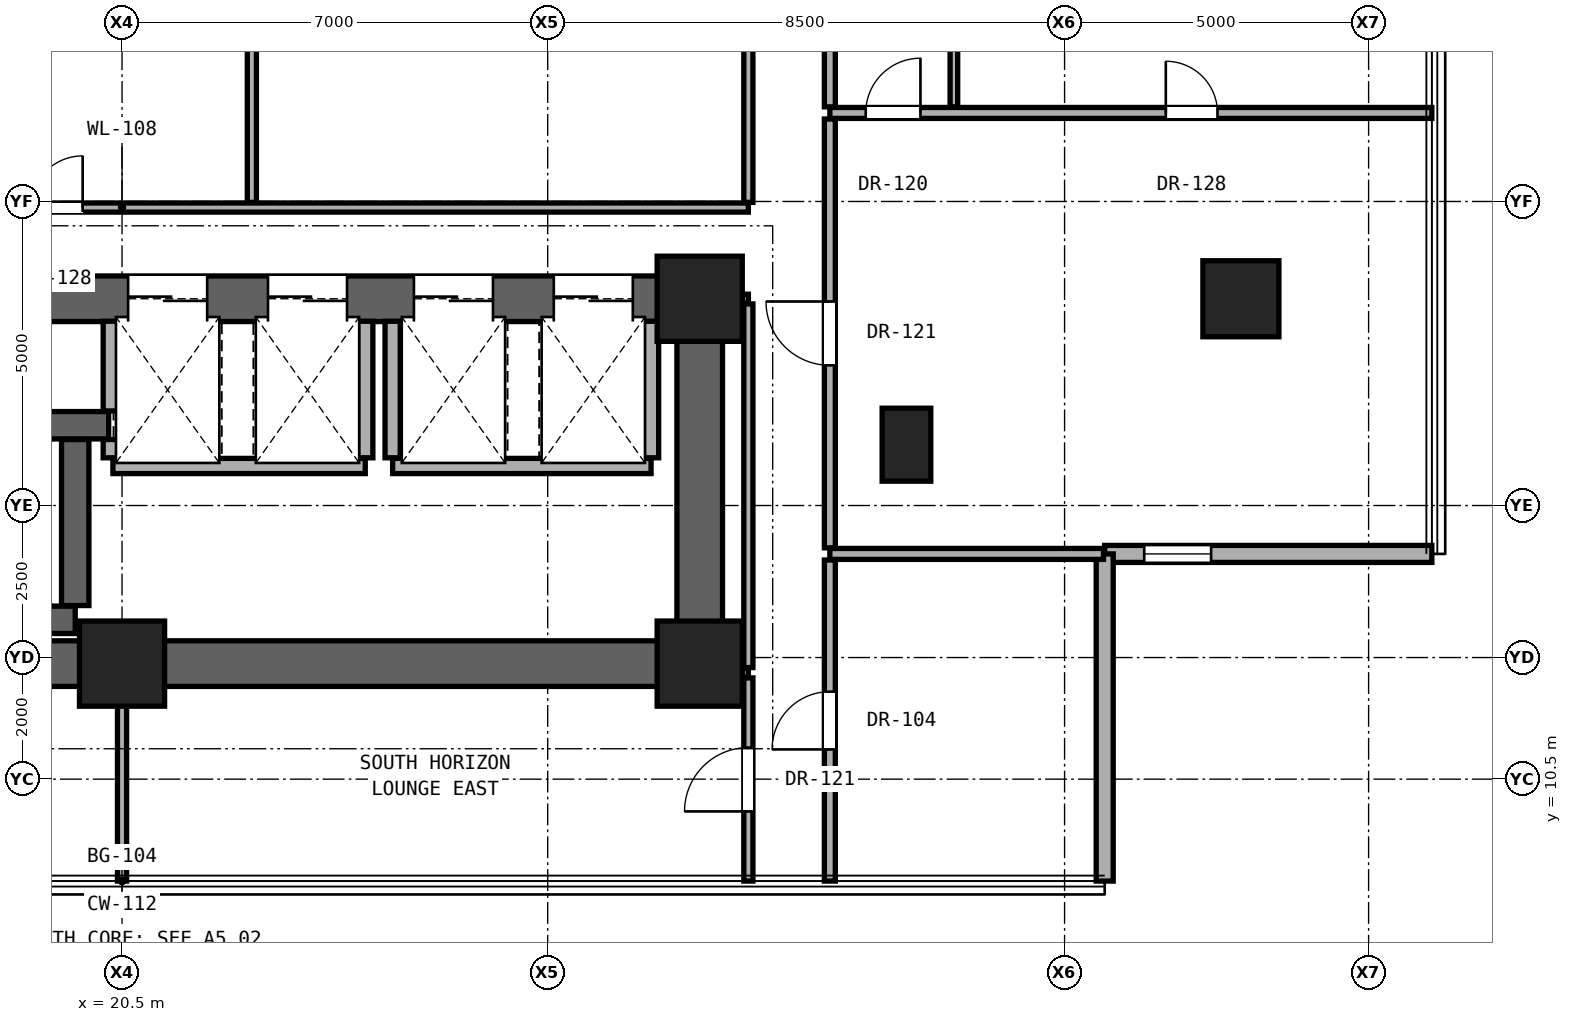
"""IFC4 building model, lengths in metres.
Left out: names, types, materials, properties, quantities, classifications, styles, units other than length and angle.
Written with IfcOpenShell. Run it as: python <this file> out.ifc"""

import sys

from ifc_helpers import new_model, si_unit, direction, frame, frame_2d, origin, origin_2d, place, context, subcontext, project, spatial, rectangle, hollow_rectangle, extrude, element, fill, save


model = new_model("IFC4")
c1 = context("Model", 3, precision=1e-05, world=origin(), true_north=direction((0.0, 1.0)))
c2 = subcontext(c1, "Body", "Model", "MODEL_VIEW")
j1 = project(units=[si_unit("LENGTHUNIT", "METRE"), si_unit("PLANEANGLEUNIT", "RADIAN")], contexts=[c1])
p1 = place(None, origin())
s1 = spatial("IfcSite", under=j1, at=p1, CompositionType="ELEMENT")
p2 = place(p1, origin())
s2 = spatial("IfcBuilding", under=s1, at=p2, CompositionType="ELEMENT")
p3 = place(p2, frame((0.0, 0.0, 29.0)))
s3 = spatial("IfcBuildingStorey", under=s2, at=p3, CompositionType="ELEMENT", Elevation=29.0)
for number, where, z_axis, x_axis in (
    (1, (20.5, 12.4, 0.0), (0.0, 0.0, 1.0), (1.0, 0.0, 0.0)),
    (2, (30.0, 12.4, 0.0), (0.0, 0.0, 1.0), (1.0, 0.0, 0.0)),
    (3, (30.0, 18.4, 0.0), (0.0, 0.0, 1.0), (1.0, 0.0, 0.0)),
):
    element("IfcColumn", number, at=place(p3, frame(where, z_axis=z_axis, x_axis=x_axis)), inside=s3, PredefinedType="COLUMN", context=c2, shape_type="SweptSolid", body=[
        extrude(rectangle(XDim=1.4, YDim=1.4, at=origin_2d()), origin(), (0.0, 0.0, 1.0), 3.3),
    ])
p4 = place(p3, frame((38.9, 18.4, 0.0), z_axis=(0.0, 0.0, 1.0), x_axis=(1.0, 0.0, 0.0)))
e4 = element("IfcColumn", 4, at=p4, inside=s3, PredefinedType="COLUMN", context=c2, shape_type="SweptSolid", body=[
    extrude(hollow_rectangle(XDim=1.25, YDim=1.25, WallThickness=0.07, at=origin_2d()), origin(), (0.0, 0.0, 1.0), 3.3),
])
p5 = place(p3, frame((33.4, 16.0, 0.0), z_axis=(0.0, 0.0, 1.0), x_axis=(1.0, 0.0, 0.0)))
e5 = element("IfcColumn", 5, at=p5, inside=s3, PredefinedType="PILASTER", context=c2, shape_type="SweptSolid", body=[
    extrude(rectangle(XDim=0.8, YDim=1.2, at=origin_2d()), origin(), (0.0, 0.0, 1.0), 3.3),
])
p6 = place(p3, frame((11.0, 12.4, 0.0), z_axis=(0.0, 0.0, 1.0), x_axis=(1.0, 0.0, 0.0)))
e6 = element("IfcWall", 6, at=p6, inside=s3, PredefinedType="SHEAR", context=c2, shape_type="SweptSolid", body=[
    extrude(rectangle(XDim=19.0, YDim=0.75, at=frame_2d((9.5, 0.0))), origin(), (0.0, 0.0, 1.0), 3.06),
])
p7 = place(p3, frame((30.0, 12.4, 0.0), z_axis=(0.0, 0.0, 1.0), x_axis=(0.0, 1.0, 0.0)))
e7 = element("IfcWall", 7, at=p7, inside=s3, PredefinedType="SHEAR", context=c2, shape_type="SweptSolid", body=[
    extrude(rectangle(XDim=6.0, YDim=0.75, at=frame_2d((3.0, 0.0))), origin(), (0.0, 0.0, 1.0), 3.06),
])
p8 = place(p3, frame((11.0, 18.4, 0.0), z_axis=(0.0, 0.0, 1.0), x_axis=(1.0, 0.0, 0.0)))
e8 = element("IfcWall", 8, at=p8, inside=s3, PredefinedType="SHEAR", context=c2, shape_type="SweptSolid", body=[
    extrude(rectangle(XDim=19.0, YDim=0.75, at=frame_2d((9.5, 0.0))), origin(), (0.0, 0.0, 1.0), 3.06),
])
p9 = place(p8, frame((4.175, 0.0, 0.0)))
e9 = element("IfcOpeningElement", 9, at=p9, cuts=e8, PredefinedType="OPENING", context=c2, shape_type="SweptSolid", body=[
    extrude(rectangle(XDim=1.2, YDim=2.25, at=frame_2d((0.6, 1.125))), frame((0.0, 0.385, 0.0), z_axis=(0.0, -1.0, 0.0), x_axis=(1.0, 0.0, 0.0)), (0.0, 0.0, 1.0), 0.77),
])
p10 = place(p8, frame((9.6, 0.0, 0.0)))
e10 = element("IfcOpeningElement", 10, at=p10, cuts=e8, PredefinedType="OPENING", context=c2, shape_type="SweptSolid", body=[
    extrude(rectangle(XDim=1.3, YDim=2.3, at=frame_2d((0.65, 1.15))), frame((0.0, 0.385, 0.0), z_axis=(0.0, -1.0, 0.0), x_axis=(1.0, 0.0, 0.0)), (0.0, 0.0, 1.0), 0.77),
])
p11 = place(p8, frame((11.9, 0.0, 0.0)))
e11 = element("IfcOpeningElement", 11, at=p11, cuts=e8, PredefinedType="OPENING", context=c2, shape_type="SweptSolid", body=[
    extrude(rectangle(XDim=1.3, YDim=2.3, at=frame_2d((0.65, 1.15))), frame((0.0, 0.385, 0.0), z_axis=(0.0, -1.0, 0.0), x_axis=(1.0, 0.0, 0.0)), (0.0, 0.0, 1.0), 0.77),
])
p12 = place(p8, frame((14.3, 0.0, 0.0)))
e12 = element("IfcOpeningElement", 12, at=p12, cuts=e8, PredefinedType="OPENING", context=c2, shape_type="SweptSolid", body=[
    extrude(rectangle(XDim=1.3, YDim=2.3, at=frame_2d((0.65, 1.15))), frame((0.0, 0.385, 0.0), z_axis=(0.0, -1.0, 0.0), x_axis=(1.0, 0.0, 0.0)), (0.0, 0.0, 1.0), 0.77),
])
p13 = place(p8, frame((16.6, 0.0, 0.0)))
e13 = element("IfcOpeningElement", 13, at=p13, cuts=e8, PredefinedType="OPENING", context=c2, shape_type="SweptSolid", body=[
    extrude(rectangle(XDim=1.3, YDim=2.3, at=frame_2d((0.65, 1.15))), frame((0.0, 0.385, 0.0), z_axis=(0.0, -1.0, 0.0), x_axis=(1.0, 0.0, 0.0)), (0.0, 0.0, 1.0), 0.77),
])
p14 = place(p3, frame((36.66, 14.204, 0.0), z_axis=(0.0, 0.0, 1.0), x_axis=(1.0, 0.0, 0.0)))
e14 = element("IfcWall", 14, at=p14, inside=s3, PredefinedType="SOLIDWALL", context=c2, shape_type="SweptSolid", body=[
    extrude(rectangle(XDim=5.38, YDim=0.28, at=frame_2d((2.69, 0.0))), origin(), (0.0, 0.0, 1.0), 3.04),
])
p15 = place(p14, frame((0.65, 0.0, 0.85)))
e15 = element("IfcOpeningElement", 15, at=p15, cuts=e14, PredefinedType="OPENING", context=c2, shape_type="SweptSolid", body=[
    extrude(rectangle(XDim=1.1, YDim=2.0, at=frame_2d((0.55, 1.0))), frame((0.0, 0.15, 0.0), z_axis=(0.0, -1.0, 0.0), x_axis=(1.0, 0.0, 0.0)), (0.0, 0.0, 1.0), 0.3),
])
p16 = place(p3, frame((36.66, 8.824, 0.0), z_axis=(0.0, 0.0, 1.0), x_axis=(0.0, 1.0, 0.0)))
e16 = element("IfcWall", 16, at=p16, inside=s3, PredefinedType="SOLIDWALL", context=c2, shape_type="SweptSolid", body=[
    extrude(rectangle(XDim=5.38, YDim=0.28, at=frame_2d((2.69, 0.0))), origin(), (0.0, 0.0, 1.0), 3.04),
])
p17 = place(p3, frame((30.37, 12.25, 0.0), z_axis=(0.0, 0.0, 1.0), x_axis=(1.0, 0.0, 0.0)))
e17 = element("IfcWall", 17, at=p17, inside=s3, PredefinedType="PARTITIONING", context=c2, shape_type="SweptSolid", body=[
    extrude(rectangle(XDim=0.43, YDim=0.15, at=frame_2d((0.215, 0.0))), origin(), (0.0, 0.0, 1.0), 3.06),
])
p18 = place(p3, frame((11.37, 13.12, 0.0), z_axis=(0.0, 0.0, 1.0), x_axis=(1.0, 0.0, 0.0)))
e18 = element("IfcWall", 18, at=p18, inside=s3, PredefinedType="SHEAR", context=c2, shape_type="SweptSolid", body=[
    extrude(rectangle(XDim=8.36, YDim=0.45, at=frame_2d((4.18, 0.0))), origin(), (0.0, 0.0, 1.0), 3.06),
])
p19 = place(p3, frame((32.14, 14.204, 0.0), z_axis=(0.0, 0.0, 1.0), x_axis=(1.0, 0.0, 0.0)))
e19 = element("IfcWall", 19, at=p19, inside=s3, PredefinedType="PARTITIONING", context=c2, shape_type="SweptSolid", body=[
    extrude(rectangle(XDim=4.5, YDim=0.18, at=frame_2d((2.25, 0.0))), origin(), (0.0, 0.0, 1.0), 3.06),
])
p20 = place(p3, frame((20.35, 15.65, 0.0), z_axis=(0.0, 0.0, 1.0), x_axis=(1.0, 0.0, 0.0)))
e20 = element("IfcWall", 20, at=p20, inside=s3, PredefinedType="SOLIDWALL", context=c2, shape_type="SweptSolid", body=[
    extrude(rectangle(XDim=4.15, YDim=0.25, at=frame_2d((2.075, 0.0))), origin(), (0.0, 0.0, 1.0), 3.06),
])
p21 = place(p3, frame((24.95, 15.65, 0.0), z_axis=(0.0, 0.0, 1.0), x_axis=(1.0, 0.0, 0.0)))
e21 = element("IfcWall", 21, at=p21, inside=s3, PredefinedType="SOLIDWALL", context=c2, shape_type="SweptSolid", body=[
    extrude(rectangle(XDim=4.25, YDim=0.25, at=frame_2d((2.125, 0.0))), origin(), (0.0, 0.0, 1.0), 3.06),
])
p22 = place(p3, frame((11.37, 16.32, 0.0), z_axis=(0.0, 0.0, 1.0), x_axis=(1.0, 0.0, 0.0)))
e22 = element("IfcWall", 22, at=p22, inside=s3, PredefinedType="SHEAR", context=c2, shape_type="SweptSolid", body=[
    extrude(rectangle(XDim=8.91, YDim=0.45, at=frame_2d((4.455, 0.0))), origin(), (0.0, 0.0, 1.0), 3.06),
])
p23 = place(p22, frame((0.47, 0.0, 0.0)))
e23 = element("IfcOpeningElement", 23, at=p23, cuts=e22, PredefinedType="OPENING", context=c2, shape_type="SweptSolid", body=[
    extrude(rectangle(XDim=1.15, YDim=2.2, at=frame_2d((0.575, 1.1))), frame((0.0, 0.235, 0.0), z_axis=(0.0, -1.0, 0.0), x_axis=(1.0, 0.0, 0.0)), (0.0, 0.0, 1.0), 0.47),
])
p24 = place(p3, frame((30.37, 18.4, 0.0), z_axis=(0.0, 0.0, 1.0), x_axis=(1.0, 0.0, 0.0)))
e24 = element("IfcWall", 24, at=p24, inside=s3, PredefinedType="PARTITIONING", context=c2, shape_type="SweptSolid", body=[
    extrude(rectangle(XDim=0.43, YDim=0.15, at=frame_2d((0.215, 0.0))), origin(), (0.0, 0.0, 1.0), 2.436),
])
p25 = place(p3, frame((10.2, 19.9, 0.0), z_axis=(0.0, 0.0, 1.0), x_axis=(1.0, 0.0, 0.0)))
e25 = element("IfcWall", 25, at=p25, inside=s3, PredefinedType="PARTITIONING", context=c2, shape_type="SweptSolid", body=[
    extrude(rectangle(XDim=20.6, YDim=0.15, at=frame_2d((10.3, 0.0))), origin(), (0.0, 0.0, 1.0), 2.104),
])
p26 = place(p25, frame((1.695, 0.0, 0.0)))
e26 = element("IfcOpeningElement", 26, at=p26, cuts=e25, PredefinedType="OPENING", context=c2, shape_type="SweptSolid", body=[
    extrude(rectangle(XDim=0.85, YDim=2.01, at=frame_2d((0.425, 1.005))), frame((0.0, 0.085, 0.0), z_axis=(0.0, -1.0, 0.0), x_axis=(1.0, 0.0, 0.0)), (0.0, 0.0, 1.0), 0.17),
])
p27 = place(p25, frame((4.085, 0.0, 0.0)))
e27 = element("IfcOpeningElement", 27, at=p27, cuts=e25, PredefinedType="OPENING", context=c2, shape_type="SweptSolid", body=[
    extrude(rectangle(XDim=0.85, YDim=2.01, at=frame_2d((0.425, 1.005))), frame((0.0, 0.085, 0.0), z_axis=(0.0, -1.0, 0.0), x_axis=(1.0, 0.0, 0.0)), (0.0, 0.0, 1.0), 0.17),
])
p28 = place(p25, frame((8.802, 0.0, 0.0)))
e28 = element("IfcOpeningElement", 28, at=p28, cuts=e25, PredefinedType="OPENING", context=c2, shape_type="SweptSolid", body=[
    extrude(rectangle(XDim=0.85, YDim=2.01, at=frame_2d((0.425, 1.005))), frame((0.0, 0.085, 0.0), z_axis=(0.0, -1.0, 0.0), x_axis=(1.0, 0.0, 0.0)), (0.0, 0.0, 1.0), 0.17),
])
p29 = place(p3, frame((32.14, 21.456, 0.0), z_axis=(0.0, 0.0, 1.0), x_axis=(1.0, 0.0, 0.0)))
e29 = element("IfcWall", 29, at=p29, inside=s3, PredefinedType="PARTITIONING", context=c2, shape_type="SweptSolid", body=[
    extrude(rectangle(XDim=9.9, YDim=0.18, at=frame_2d((4.95, 0.0))), origin(), (0.0, 0.0, 1.0), 2.125),
])
p30 = place(p29, frame((5.525, 0.0, 0.0)))
e30 = element("IfcOpeningElement", 30, at=p30, cuts=e29, PredefinedType="OPENING", context=c2, shape_type="SweptSolid", body=[
    extrude(rectangle(XDim=0.85, YDim=2.01, at=frame_2d((0.425, 1.005))), frame((0.0, 0.1, 0.0), z_axis=(0.0, -1.0, 0.0), x_axis=(1.0, 0.0, 0.0)), (0.0, 0.0, 1.0), 0.2),
])
p31 = place(p29, frame((0.59, 0.0, 0.0)))
e31 = element("IfcOpeningElement", 31, at=p31, cuts=e29, PredefinedType="OPENING", context=c2, shape_type="SweptSolid", body=[
    extrude(rectangle(XDim=0.9, YDim=2.1, at=frame_2d((0.45, 1.05))), frame((0.0, 0.1, 0.0), z_axis=(0.0, -1.0, 0.0), x_axis=(1.0, 0.0, 0.0)), (0.0, 0.0, 1.0), 0.2),
])
p32 = place(p3, frame((19.73, 13.355, 0.0), z_axis=(0.0, 0.0, 1.0), x_axis=(0.0, 1.0, 0.0)))
e32 = element("IfcWall", 32, at=p32, inside=s3, PredefinedType="SHEAR", context=c2, shape_type="SweptSolid", body=[
    extrude(rectangle(XDim=2.73, YDim=0.45, at=frame_2d((1.365, 0.0))), origin(), (0.0, 0.0, 1.0), 3.06),
])
p33 = place(p3, frame((20.315, 15.785, 0.0), z_axis=(0.0, 0.0, 1.0), x_axis=(0.0, 1.0, 0.0)))
e33 = element("IfcWall", 33, at=p33, inside=s3, PredefinedType="SOLIDWALL", context=c2, shape_type="SweptSolid", body=[
    extrude(rectangle(XDim=0.3, YDim=0.25, at=frame_2d((0.15, 0.0))), origin(), (0.0, 0.0, 1.0), 3.06),
])
p34 = place(p3, frame((20.315, 16.555, 0.0), z_axis=(0.0, 0.0, 1.0), x_axis=(0.0, 1.0, 0.0)))
e34 = element("IfcWall", 34, at=p34, inside=s3, PredefinedType="SOLIDWALL", context=c2, shape_type="SweptSolid", body=[
    extrude(rectangle(XDim=1.475, YDim=0.25, at=frame_2d((0.738, 0.0))), origin(), (0.0, 0.0, 1.0), 3.06),
])
p35 = place(p3, frame((20.5, 8.824, 0.0), z_axis=(0.0, 0.0, 1.0), x_axis=(0.0, 1.0, 0.0)))
e35 = element("IfcWall", 35, at=p35, inside=s3, PredefinedType="PARTITIONING", context=c2, shape_type="SweptSolid", body=[
    extrude(rectangle(XDim=3.206, YDim=0.15, at=frame_2d((1.603, 0.0))), origin(), (0.0, 0.0, 1.0), 3.06),
])
p36 = place(p3, frame((22.635, 19.985, 0.0), z_axis=(0.0, 0.0, 1.0), x_axis=(0.0, 1.0, 0.0)))
e36 = element("IfcWall", 36, at=p36, inside=s3, PredefinedType="PARTITIONING", context=c2, shape_type="SweptSolid", body=[
    extrude(rectangle(XDim=13.03, YDim=0.15, at=frame_2d((6.515, 0.0))), origin(), (0.0, 0.0, 1.0), 2.104),
])
for number, where, z_axis, x_axis in (
    (37, (24.5, 15.785, 0.0), (0.0, 0.0, 1.0), (0.0, 1.0, 0.0)),
    (38, (24.95, 15.785, 0.0), (0.0, 0.0, 1.0), (0.0, 1.0, 0.0)),
    (39, (29.2, 15.785, 0.0), (0.0, 0.0, 1.0), (0.0, 1.0, 0.0)),
):
    element("IfcWall", number, at=place(p3, frame(where, z_axis=z_axis, x_axis=x_axis)), inside=s3, PredefinedType="SOLIDWALL", context=c2, shape_type="SweptSolid", body=[
        extrude(rectangle(XDim=2.245, YDim=0.25, at=frame_2d((1.123, 0.0))), origin(), (0.0, 0.0, 1.0), 3.06),
    ])
p37 = place(p3, frame((30.8, 8.824, 0.0), z_axis=(0.0, 0.0, 1.0), x_axis=(0.0, 1.0, 0.0)))
e40 = element("IfcWall", 40, at=p37, inside=s3, PredefinedType="PARTITIONING", context=c2, shape_type="SweptSolid", body=[
    extrude(rectangle(XDim=3.341, YDim=0.15, at=frame_2d((1.67, 0.0))), origin(), (0.0, 0.0, 1.0), 3.06),
])
p38 = place(p37, frame((1.146, 0.0, 0.0)))
e41 = element("IfcOpeningElement", 41, at=p38, cuts=e40, PredefinedType="OPENING", context=c2, shape_type="SweptSolid", body=[
    extrude(rectangle(XDim=1.05, YDim=2.2, at=frame_2d((0.525, 1.1))), frame((0.0, 0.085, 0.0), z_axis=(0.0, -1.0, 0.0), x_axis=(1.0, 0.0, 0.0)), (0.0, 0.0, 1.0), 0.17),
])
p39 = place(p3, frame((30.8, 12.335, 0.0), z_axis=(0.0, 0.0, 1.0), x_axis=(0.0, 1.0, 0.0)))
e42 = element("IfcWall", 42, at=p39, inside=s3, PredefinedType="PARTITIONING", context=c2, shape_type="SweptSolid", body=[
    extrude(rectangle(XDim=5.98, YDim=0.15, at=frame_2d((2.99, 0.0))), origin(), (0.0, 0.0, 1.0), 2.436),
])
p40 = place(p3, frame((30.8, 19.985, 0.0), z_axis=(0.0, 0.0, 1.0), x_axis=(0.0, 1.0, 0.0)))
e43 = element("IfcWall", 43, at=p40, inside=s3, PredefinedType="PARTITIONING", context=c2, shape_type="SweptSolid", body=[
    extrude(rectangle(XDim=13.03, YDim=0.15, at=frame_2d((6.515, 0.0))), origin(), (0.0, 0.0, 1.0), 2.279),
])
p41 = place(p3, frame((32.14, 8.824, 0.0), z_axis=(0.0, 0.0, 1.0), x_axis=(0.0, 1.0, 0.0)))
e44 = element("IfcWall", 44, at=p41, inside=s3, PredefinedType="PARTITIONING", context=c2, shape_type="SweptSolid", body=[
    extrude(rectangle(XDim=5.28, YDim=0.18, at=frame_2d((2.64, 0.0))), origin(), (0.0, 0.0, 1.0), 3.06),
])
p42 = place(p41, frame((2.165, 0.0, 0.0)))
e45 = element("IfcOpeningElement", 45, at=p42, cuts=e44, PredefinedType="OPENING", context=c2, shape_type="SweptSolid", body=[
    extrude(rectangle(XDim=0.95, YDim=2.15, at=frame_2d((0.475, 1.075))), frame((0.0, 0.1, 0.0), z_axis=(0.0, -1.0, 0.0), x_axis=(1.0, 0.0, 0.0)), (0.0, 0.0, 1.0), 0.2),
])
p43 = place(p3, frame((32.14, 14.304, 0.0), z_axis=(0.0, 0.0, 1.0), x_axis=(0.0, 1.0, 0.0)))
e46 = element("IfcWall", 46, at=p43, inside=s3, PredefinedType="PARTITIONING", context=c2, shape_type="SweptSolid", body=[
    extrude(rectangle(XDim=7.052, YDim=0.18, at=frame_2d((3.526, 0.0))), origin(), (0.0, 0.0, 1.0), 2.436),
])
p44 = place(p43, frame((3.001, 0.0, 0.0)))
e47 = element("IfcOpeningElement", 47, at=p44, cuts=e46, PredefinedType="OPENING", context=c2, shape_type="SweptSolid", body=[
    extrude(rectangle(XDim=1.05, YDim=2.2, at=frame_2d((0.525, 1.1))), frame((0.0, 0.1, 0.0), z_axis=(0.0, -1.0, 0.0), x_axis=(1.0, 0.0, 0.0)), (0.0, 0.0, 1.0), 0.2),
])
p45 = place(p3, frame((32.14, 21.556, 0.0), z_axis=(0.0, 0.0, 1.0), x_axis=(0.0, 1.0, 0.0)))
e48 = element("IfcWall", 48, at=p45, inside=s3, PredefinedType="PARTITIONING", context=c2, shape_type="SweptSolid", body=[
    extrude(rectangle(XDim=2.1, YDim=0.18, at=frame_2d((1.05, 0.0))), origin(), (0.0, 0.0, 1.0), 3.06),
])
p46 = place(p3, frame((34.18, 21.556, 0.0), z_axis=(0.0, 0.0, 1.0), x_axis=(0.0, 1.0, 0.0)))
e49 = element("IfcWall", 49, at=p46, inside=s3, PredefinedType="PARTITIONING", context=c2, shape_type="SweptSolid", body=[
    extrude(rectangle(XDim=2.1, YDim=0.125, at=frame_2d((1.05, 0.0))), origin(), (0.0, 0.0, 1.0), 3.06),
])
p47 = place(p15, origin())
e50 = element("IfcWindow", 50, at=p47, inside=s3, PartitioningType="SINGLE_PANEL", PredefinedType="WINDOW", context=c2, shape_type="SweptSolid", body=[
    extrude(rectangle(XDim=1.1, YDim=2.0, at=frame_2d((0.55, 1.0))), frame((0.0, 0.03, 0.0), z_axis=(0.0, -1.0, 0.0), x_axis=(1.0, 0.0, 0.0)), (0.0, 0.0, 1.0), 0.06),
])
fill(e15, e50)
p48 = place(p44, origin())
e51 = element("IfcDoor", 51, at=p48, inside=s3, OperationType="SINGLE_SWING_RIGHT", PredefinedType="DOOR", context=c2, shape_type="SweptSolid", body=[
    extrude(rectangle(XDim=1.05, YDim=2.2, at=frame_2d((0.525, 1.1))), frame((0.0, 0.025, 0.0), z_axis=(0.0, -1.0, 0.0), x_axis=(1.0, 0.0, 0.0)), (0.0, 0.0, 1.0), 0.05),
])
fill(e47, e51)
p49 = place(p30, origin())
e52 = element("IfcDoor", 52, at=p49, inside=s3, OperationType="SINGLE_SWING_LEFT", PredefinedType="DOOR", context=c2, shape_type="SweptSolid", body=[
    extrude(rectangle(XDim=0.85, YDim=2.01, at=frame_2d((0.425, 1.005))), frame((0.0, 0.025, 0.0), z_axis=(0.0, -1.0, 0.0), x_axis=(1.0, 0.0, 0.0)), (0.0, 0.0, 1.0), 0.05),
])
fill(e30, e52)
p50 = place(p31, origin())
e53 = element("IfcDoor", 53, at=p50, inside=s3, OperationType="SINGLE_SWING_RIGHT", PredefinedType="DOOR", context=c2, shape_type="SweptSolid", body=[
    extrude(rectangle(XDim=0.9, YDim=2.1, at=frame_2d((0.45, 1.05))), frame((0.0, 0.025, 0.0), z_axis=(0.0, -1.0, 0.0), x_axis=(1.0, 0.0, 0.0)), (0.0, 0.0, 1.0), 0.05),
])
fill(e31, e53)
p51 = place(p28, origin())
e54 = element("IfcDoor", 54, at=p51, inside=s3, OperationType="SINGLE_SWING_RIGHT", PredefinedType="DOOR", context=c2, shape_type="SweptSolid", body=[
    extrude(rectangle(XDim=0.85, YDim=2.01, at=frame_2d((0.425, 1.005))), frame((0.0, 0.025, 0.0), z_axis=(0.0, -1.0, 0.0), x_axis=(1.0, 0.0, 0.0)), (0.0, 0.0, 1.0), 0.05),
])
fill(e28, e54)
p52 = place(p38, origin())
e55 = element("IfcDoor", 55, at=p52, inside=s3, OperationType="SINGLE_SWING_LEFT", PredefinedType="DOOR", context=c2, shape_type="SweptSolid", body=[
    extrude(rectangle(XDim=1.05, YDim=2.2, at=frame_2d((0.525, 1.1))), frame((0.0, 0.025, 0.0), z_axis=(0.0, -1.0, 0.0), x_axis=(1.0, 0.0, 0.0)), (0.0, 0.0, 1.0), 0.05),
])
fill(e41, e55)
p53 = place(p42, origin())
e56 = element("IfcDoor", 56, at=p53, inside=s3, OperationType="SINGLE_SWING_LEFT", PredefinedType="DOOR", context=c2, shape_type="SweptSolid", body=[
    extrude(rectangle(XDim=0.95, YDim=2.15, at=frame_2d((0.475, 1.075))), frame((0.0, 0.025, 0.0), z_axis=(0.0, -1.0, 0.0), x_axis=(1.0, 0.0, 0.0)), (0.0, 0.0, 1.0), 0.05),
])
fill(e45, e56)
p54 = place(p10, origin())
e57 = element("IfcDoor", 57, at=p54, inside=s3, OperationType="DOUBLE_DOOR_SLIDING", PredefinedType="DOOR", context=c2, shape_type="SweptSolid", body=[
    extrude(rectangle(XDim=1.3, YDim=2.3, at=frame_2d((0.65, 1.15))), frame((0.0, 0.025, 0.0), z_axis=(0.0, -1.0, 0.0), x_axis=(1.0, 0.0, 0.0)), (0.0, 0.0, 1.0), 0.05),
])
fill(e10, e57)
p55 = place(p11, origin())
e58 = element("IfcDoor", 58, at=p55, inside=s3, OperationType="DOUBLE_DOOR_SLIDING", PredefinedType="DOOR", context=c2, shape_type="SweptSolid", body=[
    extrude(rectangle(XDim=1.3, YDim=2.3, at=frame_2d((0.65, 1.15))), frame((0.0, 0.025, 0.0), z_axis=(0.0, -1.0, 0.0), x_axis=(1.0, 0.0, 0.0)), (0.0, 0.0, 1.0), 0.05),
])
fill(e11, e58)
p56 = place(p12, origin())
e59 = element("IfcDoor", 59, at=p56, inside=s3, OperationType="DOUBLE_DOOR_SLIDING", PredefinedType="DOOR", context=c2, shape_type="SweptSolid", body=[
    extrude(rectangle(XDim=1.3, YDim=2.3, at=frame_2d((0.65, 1.15))), frame((0.0, 0.025, 0.0), z_axis=(0.0, -1.0, 0.0), x_axis=(1.0, 0.0, 0.0)), (0.0, 0.0, 1.0), 0.05),
])
fill(e12, e59)
p57 = place(p13, origin())
e60 = element("IfcDoor", 60, at=p57, inside=s3, OperationType="DOUBLE_DOOR_SLIDING", PredefinedType="DOOR", context=c2, shape_type="SweptSolid", body=[
    extrude(rectangle(XDim=1.3, YDim=2.3, at=frame_2d((0.65, 1.15))), frame((0.0, 0.025, 0.0), z_axis=(0.0, -1.0, 0.0), x_axis=(1.0, 0.0, 0.0)), (0.0, 0.0, 1.0), 0.05),
])
fill(e13, e60)
save(model, sys.argv[1])
